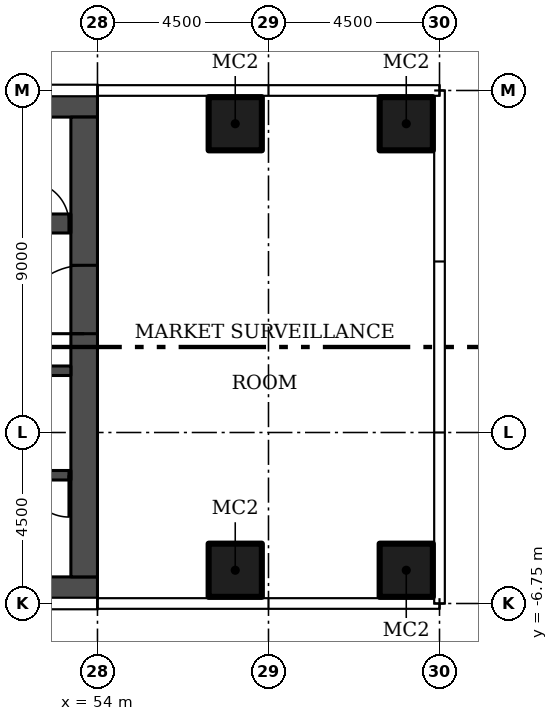
"""IFC4 building model, lengths in metres.
Left out: names, types, materials, properties, quantities, classifications, styles, units other than length and angle.
Written with IfcOpenShell. Run it as: python <this file> out.ifc"""

import sys

from ifc_helpers import new_model, si_unit, direction, frame, frame_2d, origin, origin_2d, place, context, subcontext, project, spatial, rectangle, hollow_rectangle, extrude, element, fill, save


model = new_model("IFC4")
c1 = context("Model", 3, precision=1e-05, world=origin(), true_north=direction((0.0, 1.0)))
c2 = subcontext(c1, "Body", "Model", "MODEL_VIEW")
j1 = project(units=[si_unit("LENGTHUNIT", "METRE"), si_unit("PLANEANGLEUNIT", "RADIAN")], contexts=[c1])
p1 = place(None, origin())
s1 = spatial("IfcSite", under=j1, at=p1, CompositionType="ELEMENT")
p2 = place(p1, origin())
s2 = spatial("IfcBuilding", under=s1, at=p2, CompositionType="ELEMENT")
p3 = place(p2, frame((0.0, 0.0, 73.2)))
s3 = spatial("IfcBuildingStorey", under=s2, at=p3, CompositionType="ELEMENT", Elevation=73.2)
for number, where in (
    (1, (57.625, -5.875, 0.0)),
    (2, (62.125, -5.875, 0.0)),
    (3, (57.625, 5.875, 0.0)),
    (4, (62.125, 5.875, 0.0)),
):
    element("IfcColumn", number, at=place(p3, frame(where)), inside=s3, PredefinedType="COLUMN", context=c2, shape_type="SweptSolid", body=[
        extrude(hollow_rectangle(XDim=1.4, YDim=1.4, WallThickness=0.05, at=origin_2d()), origin(), (0.0, 0.0, 1.0), 3.45),
    ])
for number, where, z_axis, x_axis in (
    (5, (54.0, -6.4, 0.0), (0.0, 0.0, 1.0), (-1.0, 0.0, 0.0)),
    (6, (54.0, 6.4, 0.0), (0.0, 0.0, 1.0), (-1.0, 0.0, 0.0)),
):
    element("IfcWall", number, at=place(p3, frame(where, z_axis=z_axis, x_axis=x_axis)), inside=s3, PredefinedType="SHEAR", context=c2, shape_type="SweptSolid", body=[
        extrude(rectangle(XDim=13.5, YDim=0.7, at=frame_2d((6.75, 0.0))), origin(), (0.0, 0.0, 1.0), 3.45),
    ])
p4 = place(p3, frame((53.65, -6.05, 0.0), z_axis=(0.0, 0.0, 1.0), x_axis=(0.0, 1.0, 0.0)))
e7 = element("IfcWall", 7, at=p4, inside=s3, PredefinedType="SHEAR", context=c2, shape_type="SweptSolid", body=[
    extrude(rectangle(XDim=12.1, YDim=0.7, at=frame_2d((6.05, 0.0))), origin(), (0.0, 0.0, 1.0), 3.45),
])
p5 = place(p4, frame((6.4, 0.0, 0.0)))
e8 = element("IfcOpeningElement", 8, at=p5, cuts=e7, PredefinedType="OPENING", context=c2, shape_type="SweptSolid", body=[
    extrude(rectangle(XDim=1.8, YDim=2.4, at=frame_2d((0.9, 1.2))), frame((0.0, 0.36, 0.0), z_axis=(0.0, -1.0, 0.0), x_axis=(1.0, 0.0, 0.0)), (0.0, 0.0, 1.0), 0.72),
])
p6 = place(p3, frame((53.3, -3.375, 0.0), z_axis=(0.0, 0.0, 1.0), x_axis=(-1.0, 0.0, 0.0)))
e9 = element("IfcWall", 9, at=p6, inside=s3, PredefinedType="SHEAR", context=c2, shape_type="SweptSolid", body=[
    extrude(rectangle(XDim=12.1, YDim=0.25, at=frame_2d((6.05, 0.0))), origin(), (0.0, 0.0, 1.0), 3.45),
])
p7 = place(p6, frame((0.05, 0.0, 0.0)))
e10 = element("IfcOpeningElement", 10, at=p7, cuts=e9, PredefinedType="OPENING", context=c2, shape_type="SweptSolid", body=[
    extrude(rectangle(XDim=1.1, YDim=2.1, at=frame_2d((0.55, 1.05))), frame((0.0, 0.135, 0.0), z_axis=(0.0, -1.0, 0.0), x_axis=(1.0, 0.0, 0.0)), (0.0, 0.0, 1.0), 0.27),
])
p8 = place(p3, frame((53.3, -0.625, 0.0), z_axis=(0.0, 0.0, 1.0), x_axis=(-1.0, 0.0, 0.0)))
e11 = element("IfcWall", 11, at=p8, inside=s3, PredefinedType="SHEAR", context=c2, shape_type="SweptSolid", body=[
    extrude(rectangle(XDim=12.1, YDim=0.25, at=frame_2d((6.05, 0.0))), origin(), (0.0, 0.0, 1.0), 3.45),
])
p9 = place(p8, frame((2.25, 0.0, 0.0)))
e12 = element("IfcOpeningElement", 12, at=p9, cuts=e11, PredefinedType="OPENING", context=c2, shape_type="SweptSolid", body=[
    extrude(rectangle(XDim=1.2, YDim=2.1, at=frame_2d((0.6, 1.05))), frame((0.0, 0.135, 0.0), z_axis=(0.0, -1.0, 0.0), x_axis=(1.0, 0.0, 0.0)), (0.0, 0.0, 1.0), 0.27),
])
p10 = place(p8, frame((9.2, 0.0, 0.0)))
e13 = element("IfcOpeningElement", 13, at=p10, cuts=e11, PredefinedType="OPENING", context=c2, shape_type="SweptSolid", body=[
    extrude(rectangle(XDim=0.9, YDim=2.1, at=frame_2d((0.45, 1.05))), frame((0.0, 0.135, 0.0), z_axis=(0.0, -1.0, 0.0), x_axis=(1.0, 0.0, 0.0)), (0.0, 0.0, 1.0), 0.27),
])
p11 = place(p8, frame((10.825, 0.0, 0.0)))
e14 = element("IfcOpeningElement", 14, at=p11, cuts=e11, PredefinedType="OPENING", context=c2, shape_type="SweptSolid", body=[
    extrude(rectangle(XDim=0.9, YDim=2.1, at=frame_2d((0.45, 1.05))), frame((0.0, 0.135, 0.0), z_axis=(0.0, -1.0, 0.0), x_axis=(1.0, 0.0, 0.0)), (0.0, 0.0, 1.0), 0.27),
])
p12 = place(p3, frame((46.0, 3.25, 0.0)))
e15 = element("IfcWall", 15, at=p12, inside=s3, PredefinedType="SHEAR", context=c2, shape_type="SweptSolid", body=[
    extrude(rectangle(XDim=7.3, YDim=0.5, at=frame_2d((3.65, 0.0))), origin(), (0.0, 0.0, 1.0), 3.45),
])
p13 = place(p12, frame((6.15, 0.0, 0.0)))
e16 = element("IfcOpeningElement", 16, at=p13, cuts=e15, PredefinedType="OPENING", context=c2, shape_type="SweptSolid", body=[
    extrude(rectangle(XDim=1.1, YDim=2.1, at=frame_2d((0.55, 1.05))), frame((0.0, 0.26, 0.0), z_axis=(0.0, -1.0, 0.0), x_axis=(1.0, 0.0, 0.0)), (0.0, 0.0, 1.0), 0.52),
])
p14 = place(p5, origin())
e17 = element("IfcDoor", 17, at=p14, inside=s3, OperationType="DOUBLE_DOOR_SINGLE_SWING", PredefinedType="DOOR", context=c2, shape_type="SweptSolid", body=[
    extrude(rectangle(XDim=1.8, YDim=2.4, at=frame_2d((0.9, 1.2))), frame((0.0, 0.025, 0.0), z_axis=(0.0, -1.0, 0.0), x_axis=(1.0, 0.0, 0.0)), (0.0, 0.0, 1.0), 0.05),
])
fill(e8, e17)
p15 = place(p7, origin())
e18 = element("IfcDoor", 18, at=p15, inside=s3, OperationType="SINGLE_SWING_LEFT", PredefinedType="DOOR", context=c2, shape_type="SweptSolid", body=[
    extrude(rectangle(XDim=1.1, YDim=2.1, at=frame_2d((0.55, 1.05))), frame((0.0, 0.025, 0.0), z_axis=(0.0, -1.0, 0.0), x_axis=(1.0, 0.0, 0.0)), (0.0, 0.0, 1.0), 0.05),
])
fill(e10, e18)
p16 = place(p13, origin())
e19 = element("IfcDoor", 19, at=p16, inside=s3, OperationType="SINGLE_SWING_RIGHT", PredefinedType="DOOR", context=c2, shape_type="SweptSolid", body=[
    extrude(rectangle(XDim=1.1, YDim=2.1, at=frame_2d((0.55, 1.05))), frame((0.0, 0.025, 0.0), z_axis=(0.0, -1.0, 0.0), x_axis=(1.0, 0.0, 0.0)), (0.0, 0.0, 1.0), 0.05),
])
fill(e16, e19)
save(model, sys.argv[1])
